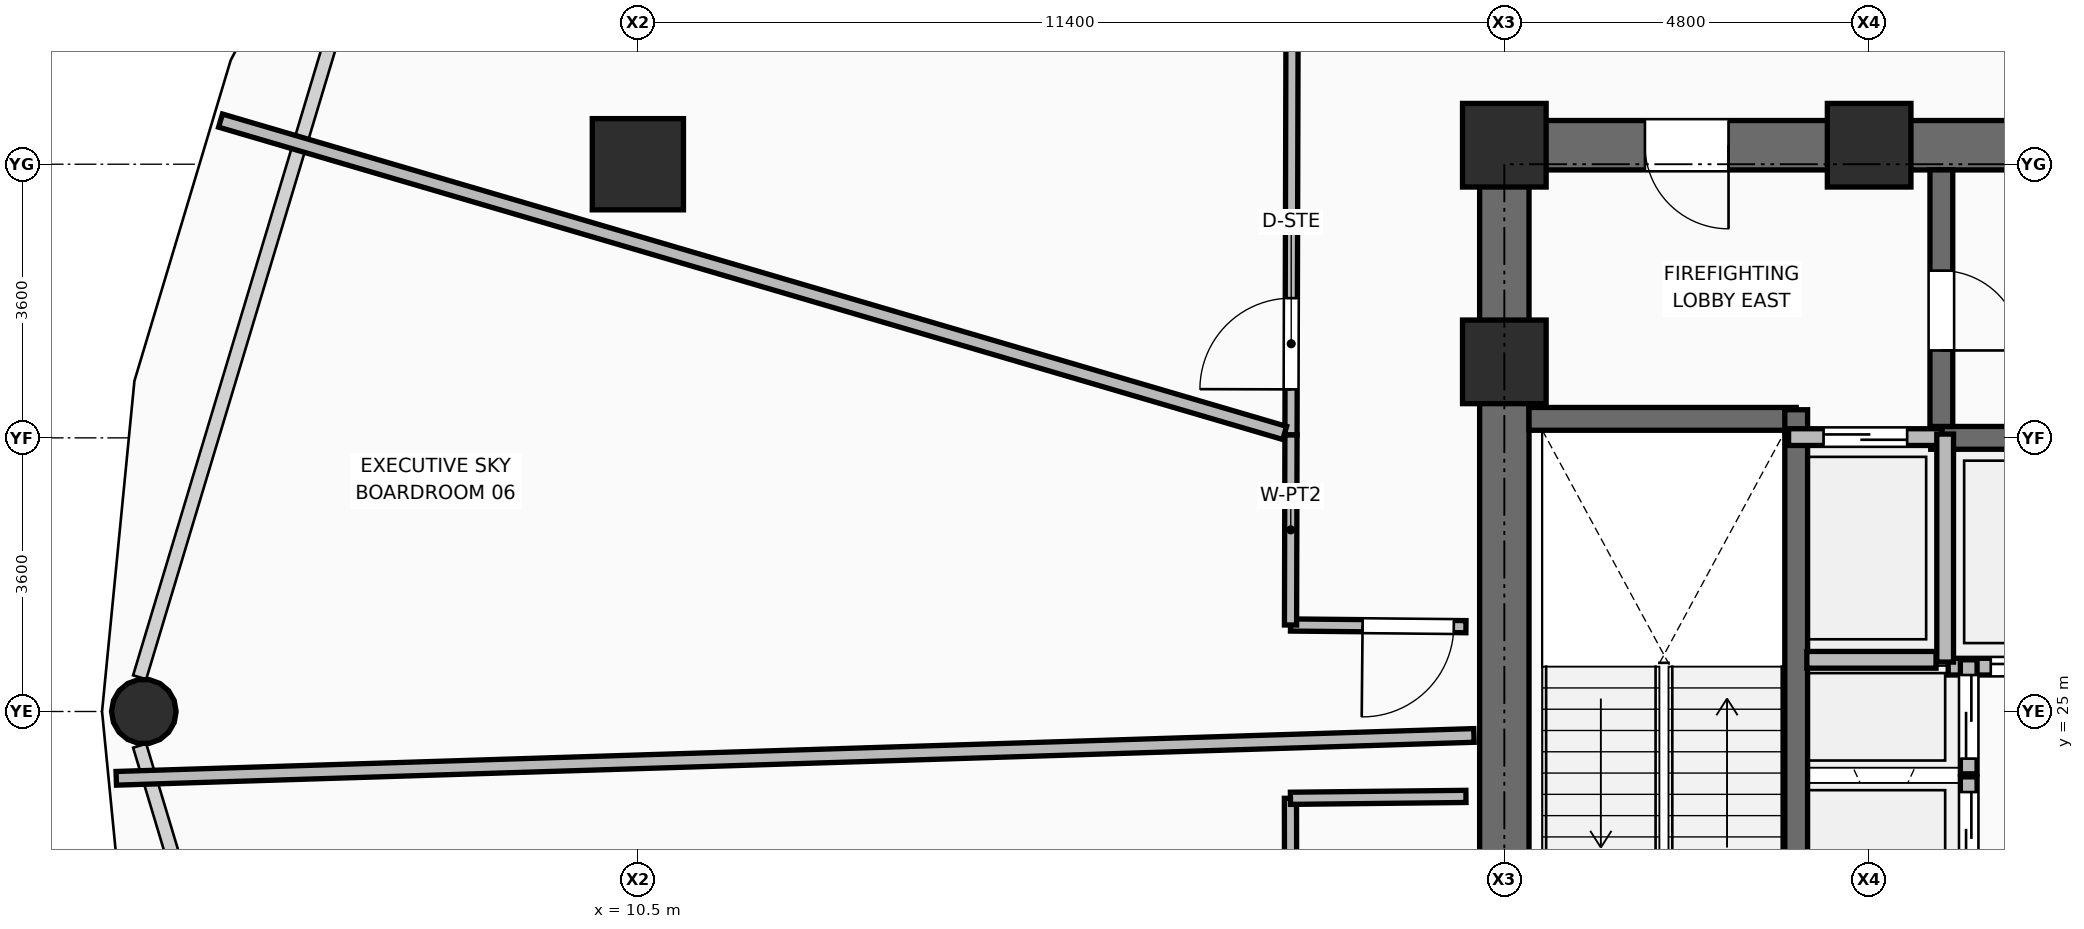
"""IFC4 building model, lengths in metres.
Left out: names, types, materials, properties, quantities, classifications, styles, units other than length and angle.
Written with IfcOpenShell. Run it as: python <this file> out.ifc"""

import sys

from ifc_helpers import new_model, si_unit, direction, frame, frame_2d, origin, origin_2d, place, context, subcontext, project, spatial, rectangle, hollow_rectangle, hollow_circle, extrude, element, fill, save


model = new_model("IFC4")
c1 = context("Model", 3, precision=1e-05, world=origin(), true_north=direction((0.0, 1.0)))
c2 = subcontext(c1, "Body", "Model", "MODEL_VIEW")
j1 = project(units=[si_unit("LENGTHUNIT", "METRE"), si_unit("PLANEANGLEUNIT", "RADIAN")], contexts=[c1])
p1 = place(None, origin())
s1 = spatial("IfcSite", under=j1, at=p1, CompositionType="ELEMENT")
p2 = place(p1, origin())
s2 = spatial("IfcBuilding", under=s1, at=p2, CompositionType="ELEMENT")
p3 = place(p2, frame((0.0, 0.0, 87.0)))
s3 = spatial("IfcBuildingStorey", under=s2, at=p3, CompositionType="ELEMENT", Elevation=87.0)
for number, where, z_axis, x_axis in (
    (1, (21.9, 29.6, 0.0), (0.0, 0.0, 1.0), (1.0, 0.0, 0.0)),
    (2, (21.9, 32.45, 0.0), (0.0, 0.0, 1.0), (1.0, 0.0, 0.0)),
    (3, (26.7, 32.45, 0.0), (0.0, 0.0, 1.0), (1.0, 0.0, 0.0)),
):
    element("IfcColumn", number, at=place(p3, frame(where, z_axis=z_axis, x_axis=x_axis)), inside=s3, PredefinedType="COLUMN", context=c2, shape_type="SweptSolid", body=[
        extrude(rectangle(XDim=1.1, YDim=1.1, at=origin_2d()), origin(), (0.0, 0.0, 1.0), 3.75),
    ])
p4 = place(p3, frame((10.5, 32.2, 0.0), z_axis=(0.0, 0.0, 1.0), x_axis=(1.0, 0.0, 0.0)))
e4 = element("IfcColumn", 4, at=p4, inside=s3, PredefinedType="COLUMN", context=c2, shape_type="SweptSolid", body=[
    extrude(hollow_rectangle(XDim=1.2, YDim=1.2, WallThickness=0.045, at=origin_2d()), origin(), (0.0, 0.0, 1.0), 3.75),
])
p5 = place(p3, frame((4.0, 25.0, 0.0), z_axis=(0.127508130523, 0.0, 0.991837525329), x_axis=(0.0, 1.0, 0.0)))
e5 = element("IfcColumn", 5, at=p5, inside=s3, PredefinedType="COLUMN", context=c2, shape_type="SweptSolid", body=[
    extrude(hollow_circle(Radius=0.425, WallThickness=0.04, at=origin_2d()), origin(), (0.0, 0.0, 1.0), 3.529),
])
p6 = place(p3, frame((21.575, 32.45, 0.0), z_axis=(0.0, 0.0, 1.0), x_axis=(1.0, 0.0, 0.0)))
e6 = element("IfcWall", 6, at=p6, inside=s3, PredefinedType="SHEAR", context=c2, shape_type="SweptSolid", body=[
    extrude(rectangle(XDim=19.85, YDim=0.65, at=frame_2d((9.925, 0.0))), origin(), (0.0, 0.0, 1.0), 3.5),
])
p7 = place(p6, frame((2.175, 0.0, 0.0)))
e7 = element("IfcOpeningElement", 7, at=p7, cuts=e6, PredefinedType="OPENING", context=c2, shape_type="SweptSolid", body=[
    extrude(rectangle(XDim=1.1, YDim=2.1, at=frame_2d((0.55, 1.05))), frame((0.0, 0.335, 0.0), z_axis=(0.0, -1.0, 0.0), x_axis=(1.0, 0.0, 0.0)), (0.0, 0.0, 1.0), 0.67),
])
p8 = place(p6, frame((15.565, 0.0, 0.0)))
e8 = element("IfcOpeningElement", 8, at=p8, cuts=e6, PredefinedType="OPENING", context=c2, shape_type="SweptSolid", body=[
    extrude(rectangle(XDim=1.0, YDim=2.1, at=frame_2d((0.5, 1.05))), frame((0.0, 0.335, 0.0), z_axis=(0.0, -1.0, 0.0), x_axis=(1.0, 0.0, 0.0)), (0.0, 0.0, 1.0), 0.67),
])
p9 = place(p6, frame((17.575, 0.0, 0.0)))
e9 = element("IfcOpeningElement", 9, at=p9, cuts=e6, PredefinedType="OPENING", context=c2, shape_type="SweptSolid", body=[
    extrude(rectangle(XDim=0.9, YDim=2.1, at=frame_2d((0.45, 1.05))), frame((0.0, 0.335, 0.0), z_axis=(0.0, -1.0, 0.0), x_axis=(1.0, 0.0, 0.0)), (0.0, 0.0, 1.0), 0.67),
])
p10 = place(p3, frame((21.9, 18.125, 0.0), z_axis=(0.0, 0.0, 1.0), x_axis=(0.0, 1.0, 0.0)))
e10 = element("IfcWall", 10, at=p10, inside=s3, PredefinedType="SHEAR", context=c2, shape_type="SweptSolid", body=[
    extrude(rectangle(XDim=14.0, YDim=0.65, at=frame_2d((7.0, 0.0))), origin(), (0.0, 0.0, 1.0), 3.5),
])
p11 = place(p3, frame((22.225, 28.85, 0.0), z_axis=(0.0, 0.0, 1.0), x_axis=(1.0, 0.0, 0.0)))
e11 = element("IfcWall", 11, at=p11, inside=s3, PredefinedType="SHEAR", context=c2, shape_type="SweptSolid", body=[
    extrude(rectangle(XDim=3.515, YDim=0.3, at=frame_2d((1.757, 0.0))), origin(), (0.0, 0.0, 1.0), 3.5),
])
p12 = place(p3, frame((25.74, 20.98, 0.0), z_axis=(0.0, 0.0, 1.0), x_axis=(0.0, 1.0, 0.0)))
e12 = element("IfcWall", 12, at=p12, inside=s3, PredefinedType="SHEAR", context=c2, shape_type="SweptSolid", body=[
    extrude(rectangle(XDim=7.99, YDim=0.3, at=frame_2d((3.995, 0.0))), origin(), (0.0, 0.0, 1.0), 3.5),
])
p13 = place(p3, frame((27.51, 28.6, 0.0), z_axis=(0.0, 0.0, 1.0), x_axis=(1.0, 0.0, 0.0)))
e13 = element("IfcWall", 13, at=p13, inside=s3, PredefinedType="SHEAR", context=c2, shape_type="SweptSolid", body=[
    extrude(rectangle(XDim=8.03, YDim=0.3, at=frame_2d((4.015, 0.0))), origin(), (0.0, 0.0, 1.0), 3.5),
])
p14 = place(p3, frame((27.65, 28.75, 0.0), z_axis=(0.0, 0.0, 1.0), x_axis=(0.0, 1.0, 0.0)))
e14 = element("IfcWall", 14, at=p14, inside=s3, PredefinedType="SHEAR", context=c2, shape_type="SweptSolid", body=[
    extrude(rectangle(XDim=3.375, YDim=0.3, at=frame_2d((1.688, 0.0))), origin(), (0.0, 0.0, 1.0), 3.5),
])
p15 = place(p14, frame((1.0, 0.0, 0.0)))
e15 = element("IfcOpeningElement", 15, at=p15, cuts=e14, PredefinedType="OPENING", context=c2, shape_type="SweptSolid", body=[
    extrude(rectangle(XDim=1.05, YDim=2.1, at=frame_2d((0.525, 1.05))), frame((0.0, 0.16, 0.0), z_axis=(0.0, -1.0, 0.0), x_axis=(1.0, 0.0, 0.0)), (0.0, 0.0, 1.0), 0.32),
])
p16 = place(p3, frame((25.64, 28.61, 0.0), z_axis=(0.0, 0.0, 1.0), x_axis=(1.0, 0.0, 0.0)))
e16 = element("IfcWall", 16, at=p16, inside=s3, PredefinedType="PARTITIONING", context=c2, shape_type="SweptSolid", body=[
    extrude(rectangle(XDim=2.02, YDim=0.22, at=frame_2d((1.01, 0.0))), origin(), (0.0, 0.0, 1.0), 3.48),
])
p17 = place(p16, frame((0.46, 0.0, 0.0)))
e17 = element("IfcOpeningElement", 17, at=p17, cuts=e16, PredefinedType="OPENING", context=c2, shape_type="SweptSolid", body=[
    extrude(rectangle(XDim=1.1, YDim=2.2, at=frame_2d((0.55, 1.1))), frame((0.0, 0.12, 0.0), z_axis=(0.0, -1.0, 0.0), x_axis=(1.0, 0.0, 0.0)), (0.0, 0.0, 1.0), 0.24),
])
p18 = place(p3, frame((27.74, 25.59, 0.0), z_axis=(0.0, 0.0, 1.0), x_axis=(1.0, 0.0, 0.0)))
e18 = element("IfcWall", 18, at=p18, inside=s3, PredefinedType="PARTITIONING", context=c2, shape_type="SweptSolid", body=[
    extrude(rectangle(XDim=2.22, YDim=0.22, at=frame_2d((1.11, 0.0))), origin(), (0.0, 0.0, 1.0), 3.48),
])
p19 = place(p18, frame((0.56, 0.0, 0.0)))
e19 = element("IfcOpeningElement", 19, at=p19, cuts=e18, PredefinedType="OPENING", context=c2, shape_type="SweptSolid", body=[
    extrude(rectangle(XDim=1.1, YDim=2.2, at=frame_2d((0.55, 1.1))), frame((0.0, 0.12, 0.0), z_axis=(0.0, -1.0, 0.0), x_axis=(1.0, 0.0, 0.0)), (0.0, 0.0, 1.0), 0.24),
])
p20 = place(p3, frame((28.01, 22.64, 0.0), z_axis=(0.0, 0.0, 1.0), x_axis=(0.0, 1.0, 0.0)))
e20 = element("IfcWall", 20, at=p20, inside=s3, PredefinedType="PARTITIONING", context=c2, shape_type="SweptSolid", body=[
    extrude(rectangle(XDim=1.5, YDim=0.22, at=frame_2d((0.75, 0.0))), origin(), (0.0, 0.0, 1.0), 3.48),
])
p21 = place(p20, frame((0.2, 0.0, 0.0)))
e21 = element("IfcOpeningElement", 21, at=p21, cuts=e20, PredefinedType="OPENING", context=c2, shape_type="SweptSolid", body=[
    extrude(rectangle(XDim=1.1, YDim=2.2, at=frame_2d((0.55, 1.1))), frame((0.0, 0.12, 0.0), z_axis=(0.0, -1.0, 0.0), x_axis=(1.0, 0.0, 0.0)), (0.0, 0.0, 1.0), 0.24),
])
p22 = place(p3, frame((28.01, 24.18, 0.0), z_axis=(0.0, 0.0, 1.0), x_axis=(0.0, 1.0, 0.0)))
e22 = element("IfcWall", 22, at=p22, inside=s3, PredefinedType="PARTITIONING", context=c2, shape_type="SweptSolid", body=[
    extrude(rectangle(XDim=1.5, YDim=0.22, at=frame_2d((0.75, 0.0))), origin(), (0.0, 0.0, 1.0), 3.48),
])
p23 = place(p22, frame((0.2, 0.0, 0.0)))
e23 = element("IfcOpeningElement", 23, at=p23, cuts=e22, PredefinedType="OPENING", context=c2, shape_type="SweptSolid", body=[
    extrude(rectangle(XDim=1.1, YDim=2.2, at=frame_2d((0.55, 1.1))), frame((0.0, 0.12, 0.0), z_axis=(0.0, -1.0, 0.0), x_axis=(1.0, 0.0, 0.0)), (0.0, 0.0, 1.0), 0.24),
])
p24 = place(p3, frame((27.7, 25.65, 0.0), z_axis=(0.0, 0.0, 1.0), x_axis=(0.0, 1.0, 0.0)))
e24 = element("IfcWall", 24, at=p24, inside=s3, PredefinedType="PARTITIONING", context=c2, shape_type="SweptSolid", body=[
    extrude(rectangle(XDim=3.0, YDim=0.22, at=frame_2d((1.5, 0.0))), origin(), (0.0, 0.0, 1.0), 3.48),
])
p25 = place(p3, frame((25.88, 25.68, 0.0), z_axis=(0.0, 0.0, 1.0), x_axis=(1.0, 0.0, 0.0)))
e25 = element("IfcWall", 25, at=p25, inside=s3, PredefinedType="PARTITIONING", context=c2, shape_type="SweptSolid", body=[
    extrude(rectangle(XDim=1.7, YDim=0.22, at=frame_2d((0.85, 0.0))), origin(), (0.0, 0.0, 1.0), 3.48),
])
p26 = place(p3, frame((21.395, 26.116, 0.0), z_axis=(0.0, 0.0, 1.0), x_axis=(-0.999954689974, 0.009519348646, 0.0)))
e26 = element("IfcWall", 26, at=p26, inside=s3, PredefinedType="PARTITIONING", context=c2, shape_type="SweptSolid", body=[
    extrude(rectangle(XDim=2.308, YDim=0.16, at=frame_2d((1.154, 0.0))), origin(), (0.0, 0.0, 1.0), 3.48),
])
p27 = place(p26, frame((0.16, 0.0, 0.0)))
e27 = element("IfcOpeningElement", 27, at=p27, cuts=e26, PredefinedType="OPENING", context=c2, shape_type="SweptSolid", body=[
    extrude(rectangle(XDim=1.2, YDim=2.1, at=frame_2d((0.6, 1.05))), frame((0.0, 0.09, 0.0), z_axis=(0.0, -1.0, 0.0), x_axis=(1.0, 0.0, 0.0)), (0.0, 0.0, 1.0), 0.18),
])
p28 = place(p3, frame((19.087, 26.138, 0.0), z_axis=(0.0, 0.0, 1.0), x_axis=(0.00243830349, 0.999997027334, 0.0)))
e28 = element("IfcWall", 28, at=p28, inside=s3, PredefinedType="PARTITIONING", context=c2, shape_type="SweptSolid", body=[
    extrude(rectangle(XDim=2.503, YDim=0.16, at=frame_2d((1.251, 0.0))), origin(), (0.0, 0.0, 1.0), 3.48),
])
p29 = place(p3, frame((19.093, 28.641, 0.0), z_axis=(0.0, 0.0, 1.0), x_axis=(0.002581207523, 0.999996668678, 0.0)))
e29 = element("IfcWall", 29, at=p29, inside=s3, PredefinedType="PARTITIONING", context=c2, shape_type="SweptSolid", body=[
    extrude(rectangle(XDim=6.621, YDim=0.16, at=frame_2d((3.311, 0.0))), origin(), (0.0, 0.0, 1.0), 2.858),
])
p30 = place(p29, frame((0.597, 0.0, 0.0)))
e30 = element("IfcOpeningElement", 30, at=p30, cuts=e29, PredefinedType="OPENING", context=c2, shape_type="SweptSolid", body=[
    extrude(rectangle(XDim=1.2, YDim=2.1, at=frame_2d((0.6, 1.05))), frame((0.0, 0.09, 0.0), z_axis=(0.0, -1.0, 0.0), x_axis=(1.0, 0.0, 0.0)), (0.0, 0.0, 1.0), 0.18),
])
p31 = place(p3, frame((19.091, 20.471, 0.0), z_axis=(0.0, 0.0, 1.0), x_axis=(-0.001513729975, 0.99999885431, 0.0)))
e31 = element("IfcWall", 31, at=p31, inside=s3, PredefinedType="PARTITIONING", context=c2, shape_type="SweptSolid", body=[
    extrude(rectangle(XDim=3.387, YDim=0.16, at=frame_2d((1.693, 0.0))), origin(), (0.0, 0.0, 1.0), 2.858),
])
p32 = place(p31, frame((1.453, 0.0, 0.0)))
e32 = element("IfcOpeningElement", 32, at=p32, cuts=e31, PredefinedType="OPENING", context=c2, shape_type="SweptSolid", body=[
    extrude(rectangle(XDim=1.2, YDim=2.1, at=frame_2d((0.6, 1.05))), frame((0.0, 0.09, 0.0), z_axis=(0.0, -1.0, 0.0), x_axis=(1.0, 0.0, 0.0)), (0.0, 0.0, 1.0), 0.18),
])
p33 = place(p3, frame((19.086, 23.858, 0.0), z_axis=(0.0, 0.0, 1.0), x_axis=(0.999940706484, 0.010889605918, 0.0)))
e33 = element("IfcWall", 33, at=p33, inside=s3, PredefinedType="PARTITIONING", context=c2, shape_type="SweptSolid", body=[
    extrude(rectangle(XDim=2.309, YDim=0.16, at=frame_2d((1.155, 0.0))), origin(), (0.0, 0.0, 1.0), 3.48),
])
p34 = place(p3, frame((19.01, 28.665, 0.0), z_axis=(0.0, 0.0, 1.0), x_axis=(-0.959533182325, 0.281595582383, 0.0)))
e34 = element("IfcWall", 34, at=p34, inside=s3, PredefinedType="PARTITIONING", context=c2, shape_type="SweptSolid", body=[
    extrude(rectangle(XDim=14.592, YDim=0.18, at=frame_2d((7.296, 0.0))), origin(), (0.0, 0.0, 1.0), 2.705),
])
p35 = place(p3, frame((21.5, 24.685, 0.0), z_axis=(0.0, 0.0, 1.0), x_axis=(-0.999501988986, -0.031555887143, 0.0)))
e35 = element("IfcWall", 35, at=p35, inside=s3, PredefinedType="PARTITIONING", context=c2, shape_type="SweptSolid", body=[
    extrude(rectangle(XDim=17.872, YDim=0.18, at=frame_2d((8.936, 0.0))), origin(), (0.0, 0.0, 1.0), 2.525),
])
p36 = place(p15, frame((1.05, 0.0, 0.0), z_axis=(0.0, 0.0, 1.0), x_axis=(-1.0, 0.0, 0.0)))
e36 = element("IfcDoor", 36, at=p36, inside=s3, OperationType="SINGLE_SWING_RIGHT", PredefinedType="DOOR", context=c2, shape_type="SweptSolid", body=[
    extrude(rectangle(XDim=1.05, YDim=2.1, at=frame_2d((0.525, 1.05))), frame((0.0, 0.025, 0.0), z_axis=(0.0, -1.0, 0.0), x_axis=(1.0, 0.0, 0.0)), (0.0, 0.0, 1.0), 0.05),
])
fill(e15, e36)
p37 = place(p17, origin())
e37 = element("IfcDoor", 37, at=p37, inside=s3, OperationType="DOUBLE_DOOR_SLIDING", PredefinedType="DOOR", context=c2, shape_type="SweptSolid", body=[
    extrude(rectangle(XDim=1.1, YDim=2.2, at=frame_2d((0.55, 1.1))), frame((0.0, 0.025, 0.0), z_axis=(0.0, -1.0, 0.0), x_axis=(1.0, 0.0, 0.0)), (0.0, 0.0, 1.0), 0.05),
])
fill(e17, e37)
p38 = place(p19, frame((1.1, 0.0, 0.0), z_axis=(0.0, 0.0, 1.0), x_axis=(-1.0, 0.0, 0.0)))
e38 = element("IfcDoor", 38, at=p38, inside=s3, OperationType="DOUBLE_DOOR_SLIDING", PredefinedType="DOOR", context=c2, shape_type="SweptSolid", body=[
    extrude(rectangle(XDim=1.1, YDim=2.2, at=frame_2d((0.55, 1.1))), frame((0.0, 0.025, 0.0), z_axis=(0.0, -1.0, 0.0), x_axis=(1.0, 0.0, 0.0)), (0.0, 0.0, 1.0), 0.05),
])
fill(e19, e38)
p39 = place(p21, frame((1.1, 0.0, 0.0), z_axis=(0.0, 0.0, 1.0), x_axis=(-1.0, 0.0, 0.0)))
e39 = element("IfcDoor", 39, at=p39, inside=s3, OperationType="DOUBLE_DOOR_SLIDING", PredefinedType="DOOR", context=c2, shape_type="SweptSolid", body=[
    extrude(rectangle(XDim=1.1, YDim=2.2, at=frame_2d((0.55, 1.1))), frame((0.0, 0.025, 0.0), z_axis=(0.0, -1.0, 0.0), x_axis=(1.0, 0.0, 0.0)), (0.0, 0.0, 1.0), 0.05),
])
fill(e21, e39)
p40 = place(p23, frame((1.1, 0.0, 0.0), z_axis=(0.0, 0.0, 1.0), x_axis=(-1.0, 0.0, 0.0)))
e40 = element("IfcDoor", 40, at=p40, inside=s3, OperationType="DOUBLE_DOOR_SLIDING", PredefinedType="DOOR", context=c2, shape_type="SweptSolid", body=[
    extrude(rectangle(XDim=1.1, YDim=2.2, at=frame_2d((0.55, 1.1))), frame((0.0, 0.025, 0.0), z_axis=(0.0, -1.0, 0.0), x_axis=(1.0, 0.0, 0.0)), (0.0, 0.0, 1.0), 0.05),
])
fill(e23, e40)
p41 = place(p7, frame((1.1, 0.0, 0.0), z_axis=(0.0, 0.0, 1.0), x_axis=(-1.0, 0.0, 0.0)))
e41 = element("IfcDoor", 41, at=p41, inside=s3, OperationType="SINGLE_SWING_LEFT", PredefinedType="DOOR", context=c2, shape_type="SweptSolid", body=[
    extrude(rectangle(XDim=1.1, YDim=2.1, at=frame_2d((0.55, 1.05))), frame((0.0, 0.025, 0.0), z_axis=(0.0, -1.0, 0.0), x_axis=(1.0, 0.0, 0.0)), (0.0, 0.0, 1.0), 0.05),
])
fill(e7, e41)
p42 = place(p30, origin())
e42 = element("IfcDoor", 42, at=p42, inside=s3, OperationType="SINGLE_SWING_LEFT", PredefinedType="DOOR", context=c2, shape_type="SweptSolid", body=[
    extrude(rectangle(XDim=1.2, YDim=2.1, at=frame_2d((0.6, 1.05))), frame((0.0, 0.025, 0.0), z_axis=(0.0, -1.0, 0.0), x_axis=(1.0, 0.0, 0.0)), (0.0, 0.0, 1.0), 0.05),
])
fill(e30, e42)
p43 = place(p27, origin())
e43 = element("IfcDoor", 43, at=p43, inside=s3, OperationType="SINGLE_SWING_RIGHT", PredefinedType="DOOR", context=c2, shape_type="SweptSolid", body=[
    extrude(rectangle(XDim=1.2, YDim=2.1, at=frame_2d((0.6, 1.05))), frame((0.0, 0.025, 0.0), z_axis=(0.0, -1.0, 0.0), x_axis=(1.0, 0.0, 0.0)), (0.0, 0.0, 1.0), 0.05),
])
fill(e27, e43)
save(model, sys.argv[1])
